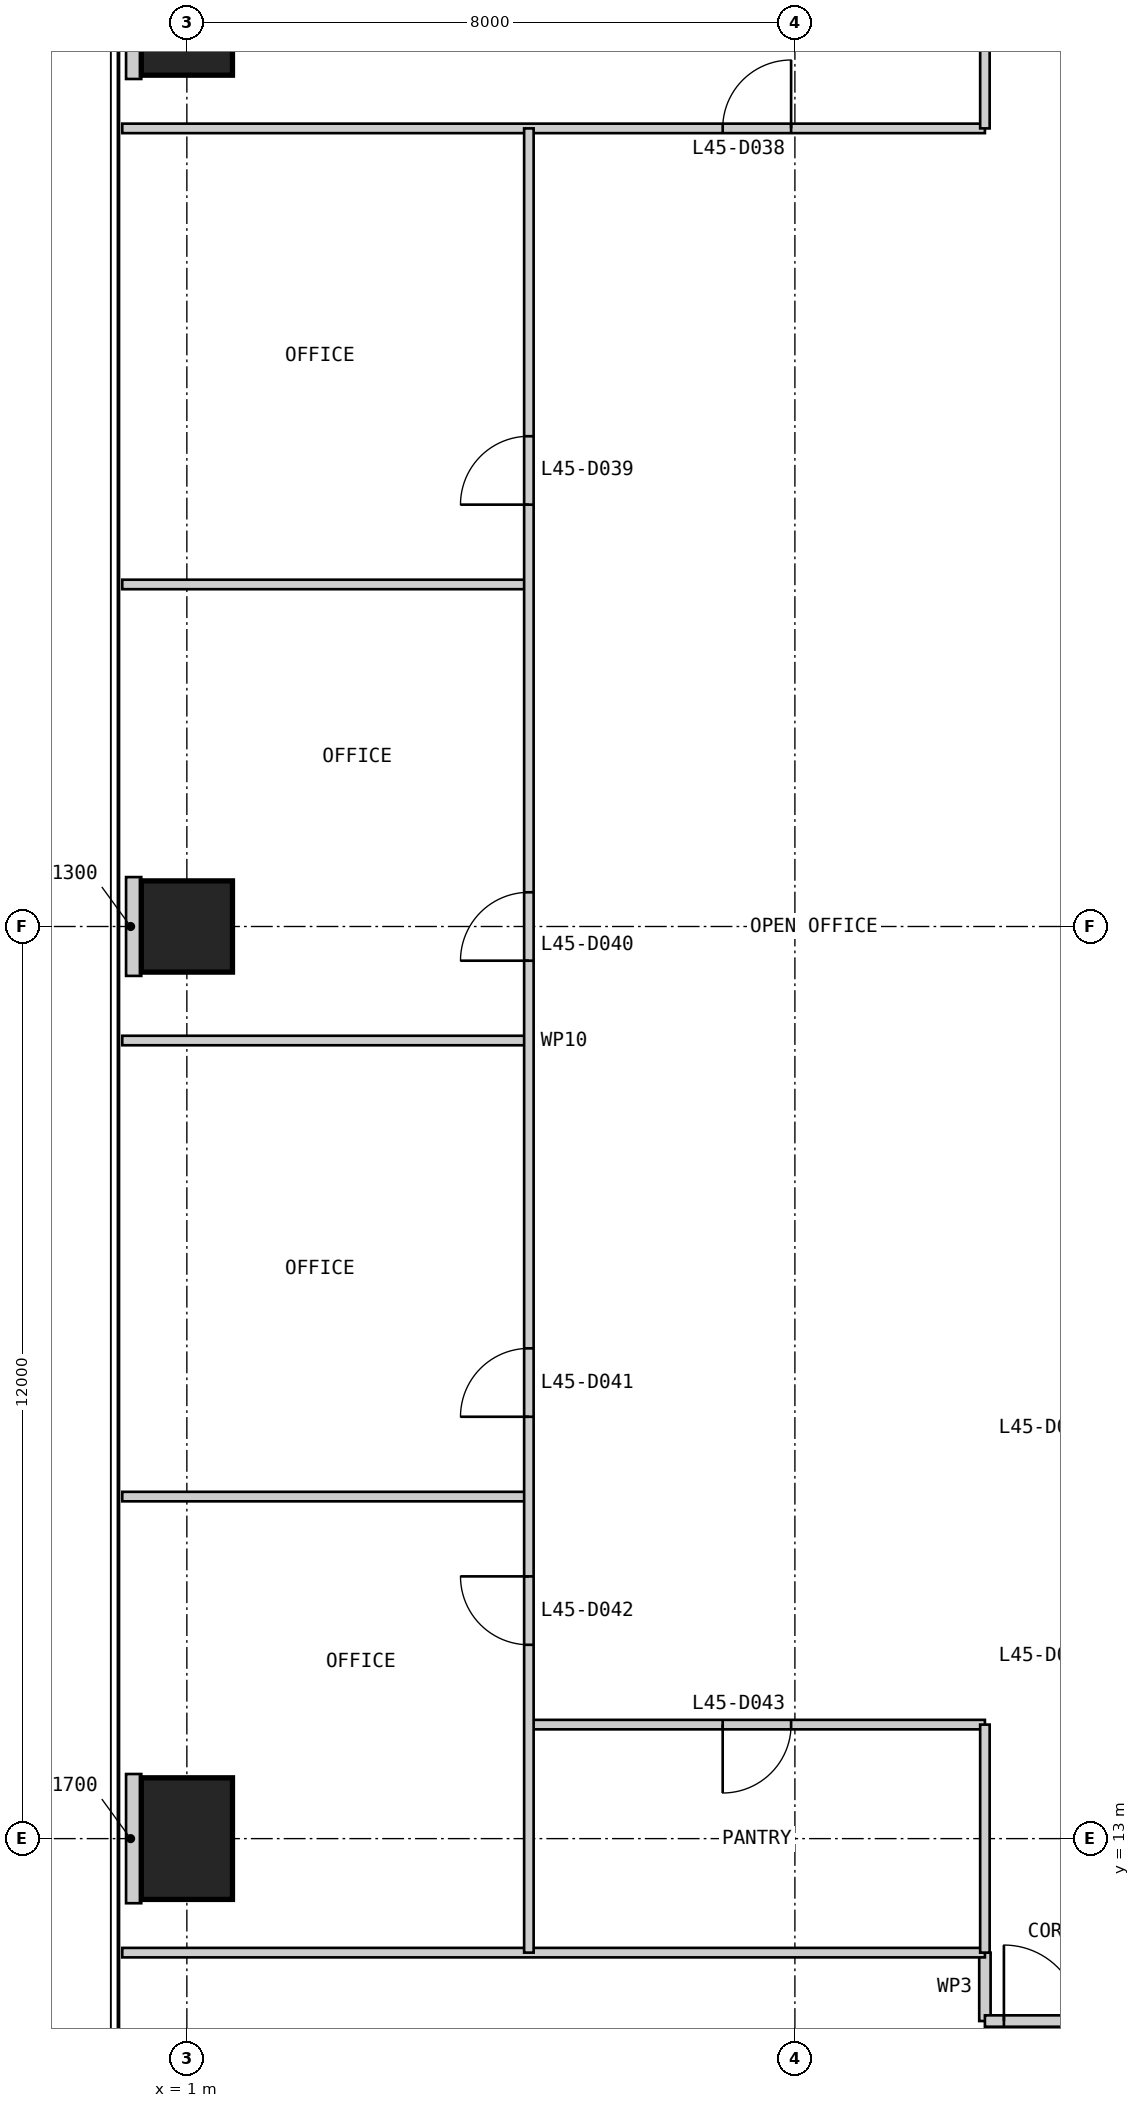
"""IFC4 building model, lengths in metres.
Left out: names, types, materials, properties, quantities, classifications, styles, units other than length and angle.
Written with IfcOpenShell. Run it as: python <this file> out.ifc"""

import sys

from ifc_helpers import new_model, si_unit, direction, frame, frame_2d, origin, origin_2d, place, context, subcontext, project, spatial, rectangle, extrude, element, fill, save


model = new_model("IFC4")
c1 = context("Model", 3, precision=1e-05, world=origin(), true_north=direction((0.0, 1.0)))
c2 = subcontext(c1, "Body", "Model", "MODEL_VIEW")
j1 = project(units=[si_unit("LENGTHUNIT", "METRE"), si_unit("PLANEANGLEUNIT", "RADIAN")], contexts=[c1])
p1 = place(None, origin())
s1 = spatial("IfcSite", under=j1, at=p1, CompositionType="ELEMENT")
p2 = place(p1, origin())
s2 = spatial("IfcBuilding", under=s1, at=p2, CompositionType="ELEMENT")
p3 = place(p2, frame((0.0, 0.0, 193.8)))
s3 = spatial("IfcBuildingStorey", under=s2, at=p3, CompositionType="ELEMENT", Elevation=193.8)
p4 = place(p3, frame((1.0, 37.0, 0.0), z_axis=(0.0, 0.0, 1.0), x_axis=(1.0, 0.0, 0.0)))
e1 = element("IfcColumn", 1, at=p4, inside=s3, PredefinedType="COLUMN", context=c2, shape_type="SweptSolid", body=[
    extrude(rectangle(XDim=1.2, YDim=1.6, at=origin_2d()), origin(), (0.0, 0.0, 1.0), 4.0),
])
p5 = place(p3, frame((1.0, 25.0, 0.0), z_axis=(0.0, 0.0, 1.0), x_axis=(1.0, 0.0, 0.0)))
e2 = element("IfcColumn", 2, at=p5, inside=s3, PredefinedType="COLUMN", context=c2, shape_type="SweptSolid", body=[
    extrude(rectangle(XDim=1.2, YDim=1.2, at=origin_2d()), origin(), (0.0, 0.0, 1.0), 4.0),
])
p6 = place(p3, frame((1.0, 13.0, 0.0), z_axis=(0.0, 0.0, 1.0), x_axis=(1.0, 0.0, 0.0)))
e3 = element("IfcColumn", 3, at=p6, inside=s3, PredefinedType="COLUMN", context=c2, shape_type="SweptSolid", body=[
    extrude(rectangle(XDim=1.2, YDim=1.6, at=origin_2d()), origin(), (0.0, 0.0, 1.0), 4.0),
])
p7 = place(p3, frame((11.5, 11.5, 0.0), z_axis=(0.0, 0.0, 1.0), x_axis=(0.0, -1.0, 0.0)))
e4 = element("IfcWall", 4, at=p7, inside=s3, PredefinedType="PARTITIONING", context=c2, shape_type="SweptSolid", body=[
    extrude(rectangle(XDim=0.9, YDim=0.15, at=frame_2d((0.45, 0.0))), origin(), (0.0, 0.0, 1.0), 3.85),
])
p8 = place(p3, frame((11.5, 10.6, 0.0), z_axis=(0.0, 0.0, 1.0), x_axis=(1.0, 0.0, 0.0)))
e5 = element("IfcWall", 5, at=p8, inside=s3, PredefinedType="PARTITIONING", context=c2, shape_type="SweptSolid", body=[
    extrude(rectangle(XDim=27.0, YDim=0.15, at=frame_2d((13.5, 0.0))), origin(), (0.0, 0.0, 1.0), 3.85),
])
p9 = place(p8, frame((12.25, 0.0, 0.0)))
e6 = element("IfcOpeningElement", 6, at=p9, cuts=e5, PredefinedType="OPENING", context=c2, shape_type="SweptSolid", body=[
    extrude(rectangle(XDim=1.0, YDim=2.2, at=frame_2d((0.5, 1.1))), frame((0.0, 0.085, 0.0), z_axis=(0.0, -1.0, 0.0), x_axis=(1.0, 0.0, 0.0)), (0.0, 0.0, 1.0), 0.17),
])
p10 = place(p8, frame((19.75, 0.0, 0.0)))
e7 = element("IfcOpeningElement", 7, at=p10, cuts=e5, PredefinedType="OPENING", context=c2, shape_type="SweptSolid", body=[
    extrude(rectangle(XDim=1.0, YDim=2.2, at=frame_2d((0.5, 1.1))), frame((0.0, 0.085, 0.0), z_axis=(0.0, -1.0, 0.0), x_axis=(1.0, 0.0, 0.0)), (0.0, 0.0, 1.0), 0.17),
])
p11 = place(p8, frame((0.25, 0.0, 0.0)))
e8 = element("IfcOpeningElement", 8, at=p11, cuts=e5, PredefinedType="OPENING", context=c2, shape_type="SweptSolid", body=[
    extrude(rectangle(XDim=1.0, YDim=2.2, at=frame_2d((0.5, 1.1))), frame((0.0, 0.085, 0.0), z_axis=(0.0, -1.0, 0.0), x_axis=(1.0, 0.0, 0.0)), (0.0, 0.0, 1.0), 0.17),
])
p12 = place(p8, frame((10.75, 0.0, 0.0)))
e9 = element("IfcOpeningElement", 9, at=p12, cuts=e5, PredefinedType="OPENING", context=c2, shape_type="SweptSolid", body=[
    extrude(rectangle(XDim=1.0, YDim=2.2, at=frame_2d((0.5, 1.1))), frame((0.0, 0.085, 0.0), z_axis=(0.0, -1.0, 0.0), x_axis=(1.0, 0.0, 0.0)), (0.0, 0.0, 1.0), 0.17),
])
p13 = place(p8, frame((22.0, 0.0, 0.0)))
e10 = element("IfcOpeningElement", 10, at=p13, cuts=e5, PredefinedType="OPENING", context=c2, shape_type="SweptSolid", body=[
    extrude(rectangle(XDim=1.0, YDim=2.2, at=frame_2d((0.5, 1.1))), frame((0.0, 0.085, 0.0), z_axis=(0.0, -1.0, 0.0), x_axis=(1.0, 0.0, 0.0)), (0.0, 0.0, 1.0), 0.17),
])
p14 = place(p8, frame((25.0, 0.0, 0.0)))
e11 = element("IfcOpeningElement", 11, at=p14, cuts=e5, PredefinedType="OPENING", context=c2, shape_type="SweptSolid", body=[
    extrude(rectangle(XDim=1.0, YDim=2.2, at=frame_2d((0.5, 1.1))), frame((0.0, 0.085, 0.0), z_axis=(0.0, -1.0, 0.0), x_axis=(1.0, 0.0, 0.0)), (0.0, 0.0, 1.0), 0.17),
])
p15 = place(p3, frame((0.15, 11.5, 0.0), z_axis=(0.0, 0.0, 1.0), x_axis=(1.0, 0.0, 0.0)))
e12 = element("IfcWall", 12, at=p15, inside=s3, PredefinedType="PARTITIONING", context=c2, shape_type="SweptSolid", body=[
    extrude(rectangle(XDim=11.35, YDim=0.125, at=frame_2d((5.675, 0.0))), origin(), (0.0, 0.0, 1.0), 3.85),
])
p16 = place(p3, frame((0.15, 35.5, 0.0), z_axis=(0.0, 0.0, 1.0), x_axis=(1.0, 0.0, 0.0)))
e13 = element("IfcWall", 13, at=p16, inside=s3, PredefinedType="PARTITIONING", context=c2, shape_type="SweptSolid", body=[
    extrude(rectangle(XDim=11.35, YDim=0.125, at=frame_2d((5.675, 0.0))), origin(), (0.0, 0.0, 1.0), 3.85),
])
p17 = place(p16, frame((7.9, 0.0, 0.0)))
e14 = element("IfcOpeningElement", 14, at=p17, cuts=e13, PredefinedType="OPENING", context=c2, shape_type="SweptSolid", body=[
    extrude(rectangle(XDim=0.9, YDim=2.2, at=frame_2d((0.45, 1.1))), frame((0.0, 0.073, 0.0), z_axis=(0.0, -1.0, 0.0), x_axis=(1.0, 0.0, 0.0)), (0.0, 0.0, 1.0), 0.145),
])
for number, where, z_axis, x_axis in (
    (15, (0.15, 29.5, 0.0), (0.0, 0.0, 1.0), (1.0, 0.0, 0.0)),
    (16, (0.15, 23.5, 0.0), (0.0, 0.0, 1.0), (1.0, 0.0, 0.0)),
    (17, (0.15, 17.5, 0.0), (0.0, 0.0, 1.0), (1.0, 0.0, 0.0)),
):
    element("IfcWall", number, at=place(p3, frame(where, z_axis=z_axis, x_axis=x_axis)), inside=s3, PredefinedType="PARTITIONING", context=c2, shape_type="SweptSolid", body=[
        extrude(rectangle(XDim=5.35, YDim=0.125, at=frame_2d((2.675, 0.0))), origin(), (0.0, 0.0, 1.0), 3.85),
    ])
p18 = place(p3, frame((5.5, 14.5, 0.0), z_axis=(0.0, 0.0, 1.0), x_axis=(1.0, 0.0, 0.0)))
e18 = element("IfcWall", 18, at=p18, inside=s3, PredefinedType="PARTITIONING", context=c2, shape_type="SweptSolid", body=[
    extrude(rectangle(XDim=6.0, YDim=0.125, at=frame_2d((3.0, 0.0))), origin(), (0.0, 0.0, 1.0), 3.85),
])
p19 = place(p18, frame((2.55, 0.0, 0.0)))
e19 = element("IfcOpeningElement", 19, at=p19, cuts=e18, PredefinedType="OPENING", context=c2, shape_type="SweptSolid", body=[
    extrude(rectangle(XDim=0.9, YDim=2.2, at=frame_2d((0.45, 1.1))), frame((0.0, 0.073, 0.0), z_axis=(0.0, -1.0, 0.0), x_axis=(1.0, 0.0, 0.0)), (0.0, 0.0, 1.0), 0.145),
])
p20 = place(p3, frame((5.5, 35.5, 0.0), z_axis=(0.0, 0.0, 1.0), x_axis=(0.0, -1.0, 0.0)))
e20 = element("IfcWall", 20, at=p20, inside=s3, PredefinedType="PARTITIONING", context=c2, shape_type="SweptSolid", body=[
    extrude(rectangle(XDim=24.0, YDim=0.125, at=frame_2d((12.0, 0.0))), origin(), (0.0, 0.0, 1.0), 3.85),
])
p21 = place(p20, frame((4.05, 0.0, 0.0)))
e21 = element("IfcOpeningElement", 21, at=p21, cuts=e20, PredefinedType="OPENING", context=c2, shape_type="SweptSolid", body=[
    extrude(rectangle(XDim=0.9, YDim=2.2, at=frame_2d((0.45, 1.1))), frame((0.0, 0.073, 0.0), z_axis=(0.0, -1.0, 0.0), x_axis=(1.0, 0.0, 0.0)), (0.0, 0.0, 1.0), 0.145),
])
p22 = place(p20, frame((10.05, 0.0, 0.0)))
e22 = element("IfcOpeningElement", 22, at=p22, cuts=e20, PredefinedType="OPENING", context=c2, shape_type="SweptSolid", body=[
    extrude(rectangle(XDim=0.9, YDim=2.2, at=frame_2d((0.45, 1.1))), frame((0.0, 0.073, 0.0), z_axis=(0.0, -1.0, 0.0), x_axis=(1.0, 0.0, 0.0)), (0.0, 0.0, 1.0), 0.145),
])
p23 = place(p20, frame((16.05, 0.0, 0.0)))
e23 = element("IfcOpeningElement", 23, at=p23, cuts=e20, PredefinedType="OPENING", context=c2, shape_type="SweptSolid", body=[
    extrude(rectangle(XDim=0.9, YDim=2.2, at=frame_2d((0.45, 1.1))), frame((0.0, 0.073, 0.0), z_axis=(0.0, -1.0, 0.0), x_axis=(1.0, 0.0, 0.0)), (0.0, 0.0, 1.0), 0.145),
])
p24 = place(p20, frame((19.05, 0.0, 0.0)))
e24 = element("IfcOpeningElement", 24, at=p24, cuts=e20, PredefinedType="OPENING", context=c2, shape_type="SweptSolid", body=[
    extrude(rectangle(XDim=0.9, YDim=2.2, at=frame_2d((0.45, 1.1))), frame((0.0, 0.073, 0.0), z_axis=(0.0, -1.0, 0.0), x_axis=(1.0, 0.0, 0.0)), (0.0, 0.0, 1.0), 0.145),
])
for number, where, z_axis, x_axis in (
    (25, (11.5, 38.5, 0.0), (0.0, 0.0, 1.0), (0.0, -1.0, 0.0)),
    (26, (11.5, 14.5, 0.0), (0.0, 0.0, 1.0), (0.0, -1.0, 0.0)),
):
    element("IfcWall", number, at=place(p3, frame(where, z_axis=z_axis, x_axis=x_axis)), inside=s3, PredefinedType="PARTITIONING", context=c2, shape_type="SweptSolid", body=[
        extrude(rectangle(XDim=3.0, YDim=0.125, at=frame_2d((1.5, 0.0))), origin(), (0.0, 0.0, 1.0), 3.85),
    ])
p25 = place(p3, frame((0.2, 37.0, 0.0), z_axis=(0.0, 0.0, 1.0), x_axis=(1.0, 0.0, 0.0)))
e27 = element("IfcWall", 27, at=p25, inside=s3, PredefinedType="PARTITIONING", context=c2, shape_type="SweptSolid", body=[
    extrude(rectangle(XDim=0.2, YDim=1.7, at=frame_2d((0.1, 0.0))), origin(), (0.0, 0.0, 1.0), 3.85),
])
p26 = place(p3, frame((0.2, 25.0, 0.0), z_axis=(0.0, 0.0, 1.0), x_axis=(1.0, 0.0, 0.0)))
e28 = element("IfcWall", 28, at=p26, inside=s3, PredefinedType="PARTITIONING", context=c2, shape_type="SweptSolid", body=[
    extrude(rectangle(XDim=0.2, YDim=1.3, at=frame_2d((0.1, 0.0))), origin(), (0.0, 0.0, 1.0), 3.85),
])
p27 = place(p3, frame((0.2, 13.0, 0.0), z_axis=(0.0, 0.0, 1.0), x_axis=(1.0, 0.0, 0.0)))
e29 = element("IfcWall", 29, at=p27, inside=s3, PredefinedType="PARTITIONING", context=c2, shape_type="SweptSolid", body=[
    extrude(rectangle(XDim=0.2, YDim=1.7, at=frame_2d((0.1, 0.0))), origin(), (0.0, 0.0, 1.0), 3.85),
])
p28 = place(p11, origin())
e30 = element("IfcDoor", 30, at=p28, inside=s3, OperationType="SINGLE_SWING_LEFT", PredefinedType="DOOR", context=c2, shape_type="SweptSolid", body=[
    extrude(rectangle(XDim=1.0, YDim=2.2, at=frame_2d((0.5, 1.1))), frame((0.0, 0.025, 0.0), z_axis=(0.0, -1.0, 0.0), x_axis=(1.0, 0.0, 0.0)), (0.0, 0.0, 1.0), 0.05),
])
fill(e8, e30)
p29 = place(p17, origin())
e31 = element("IfcDoor", 31, at=p29, inside=s3, OperationType="SINGLE_SWING_RIGHT", PredefinedType="DOOR", context=c2, shape_type="SweptSolid", body=[
    extrude(rectangle(XDim=0.9, YDim=2.2, at=frame_2d((0.45, 1.1))), frame((0.0, 0.025, 0.0), z_axis=(0.0, -1.0, 0.0), x_axis=(1.0, 0.0, 0.0)), (0.0, 0.0, 1.0), 0.05),
])
fill(e14, e31)
p30 = place(p21, frame((0.9, 0.0, 0.0), z_axis=(0.0, 0.0, 1.0), x_axis=(-1.0, 0.0, 0.0)))
e32 = element("IfcDoor", 32, at=p30, inside=s3, OperationType="SINGLE_SWING_LEFT", PredefinedType="DOOR", context=c2, shape_type="SweptSolid", body=[
    extrude(rectangle(XDim=0.9, YDim=2.2, at=frame_2d((0.45, 1.1))), frame((0.0, 0.025, 0.0), z_axis=(0.0, -1.0, 0.0), x_axis=(1.0, 0.0, 0.0)), (0.0, 0.0, 1.0), 0.05),
])
fill(e21, e32)
p31 = place(p22, frame((0.9, 0.0, 0.0), z_axis=(0.0, 0.0, 1.0), x_axis=(-1.0, 0.0, 0.0)))
e33 = element("IfcDoor", 33, at=p31, inside=s3, OperationType="SINGLE_SWING_LEFT", PredefinedType="DOOR", context=c2, shape_type="SweptSolid", body=[
    extrude(rectangle(XDim=0.9, YDim=2.2, at=frame_2d((0.45, 1.1))), frame((0.0, 0.025, 0.0), z_axis=(0.0, -1.0, 0.0), x_axis=(1.0, 0.0, 0.0)), (0.0, 0.0, 1.0), 0.05),
])
fill(e22, e33)
p32 = place(p23, frame((0.9, 0.0, 0.0), z_axis=(0.0, 0.0, 1.0), x_axis=(-1.0, 0.0, 0.0)))
e34 = element("IfcDoor", 34, at=p32, inside=s3, OperationType="SINGLE_SWING_LEFT", PredefinedType="DOOR", context=c2, shape_type="SweptSolid", body=[
    extrude(rectangle(XDim=0.9, YDim=2.2, at=frame_2d((0.45, 1.1))), frame((0.0, 0.025, 0.0), z_axis=(0.0, -1.0, 0.0), x_axis=(1.0, 0.0, 0.0)), (0.0, 0.0, 1.0), 0.05),
])
fill(e23, e34)
p33 = place(p24, frame((0.9, 0.0, 0.0), z_axis=(0.0, 0.0, 1.0), x_axis=(-1.0, 0.0, 0.0)))
e35 = element("IfcDoor", 35, at=p33, inside=s3, OperationType="SINGLE_SWING_RIGHT", PredefinedType="DOOR", context=c2, shape_type="SweptSolid", body=[
    extrude(rectangle(XDim=0.9, YDim=2.2, at=frame_2d((0.45, 1.1))), frame((0.0, 0.025, 0.0), z_axis=(0.0, -1.0, 0.0), x_axis=(1.0, 0.0, 0.0)), (0.0, 0.0, 1.0), 0.05),
])
fill(e24, e35)
p34 = place(p19, frame((0.9, 0.0, 0.0), z_axis=(0.0, 0.0, 1.0), x_axis=(-1.0, 0.0, 0.0)))
e36 = element("IfcDoor", 36, at=p34, inside=s3, OperationType="SINGLE_SWING_RIGHT", PredefinedType="DOOR", context=c2, shape_type="SweptSolid", body=[
    extrude(rectangle(XDim=0.9, YDim=2.2, at=frame_2d((0.45, 1.1))), frame((0.0, 0.025, 0.0), z_axis=(0.0, -1.0, 0.0), x_axis=(1.0, 0.0, 0.0)), (0.0, 0.0, 1.0), 0.05),
])
fill(e19, e36)
save(model, sys.argv[1])
